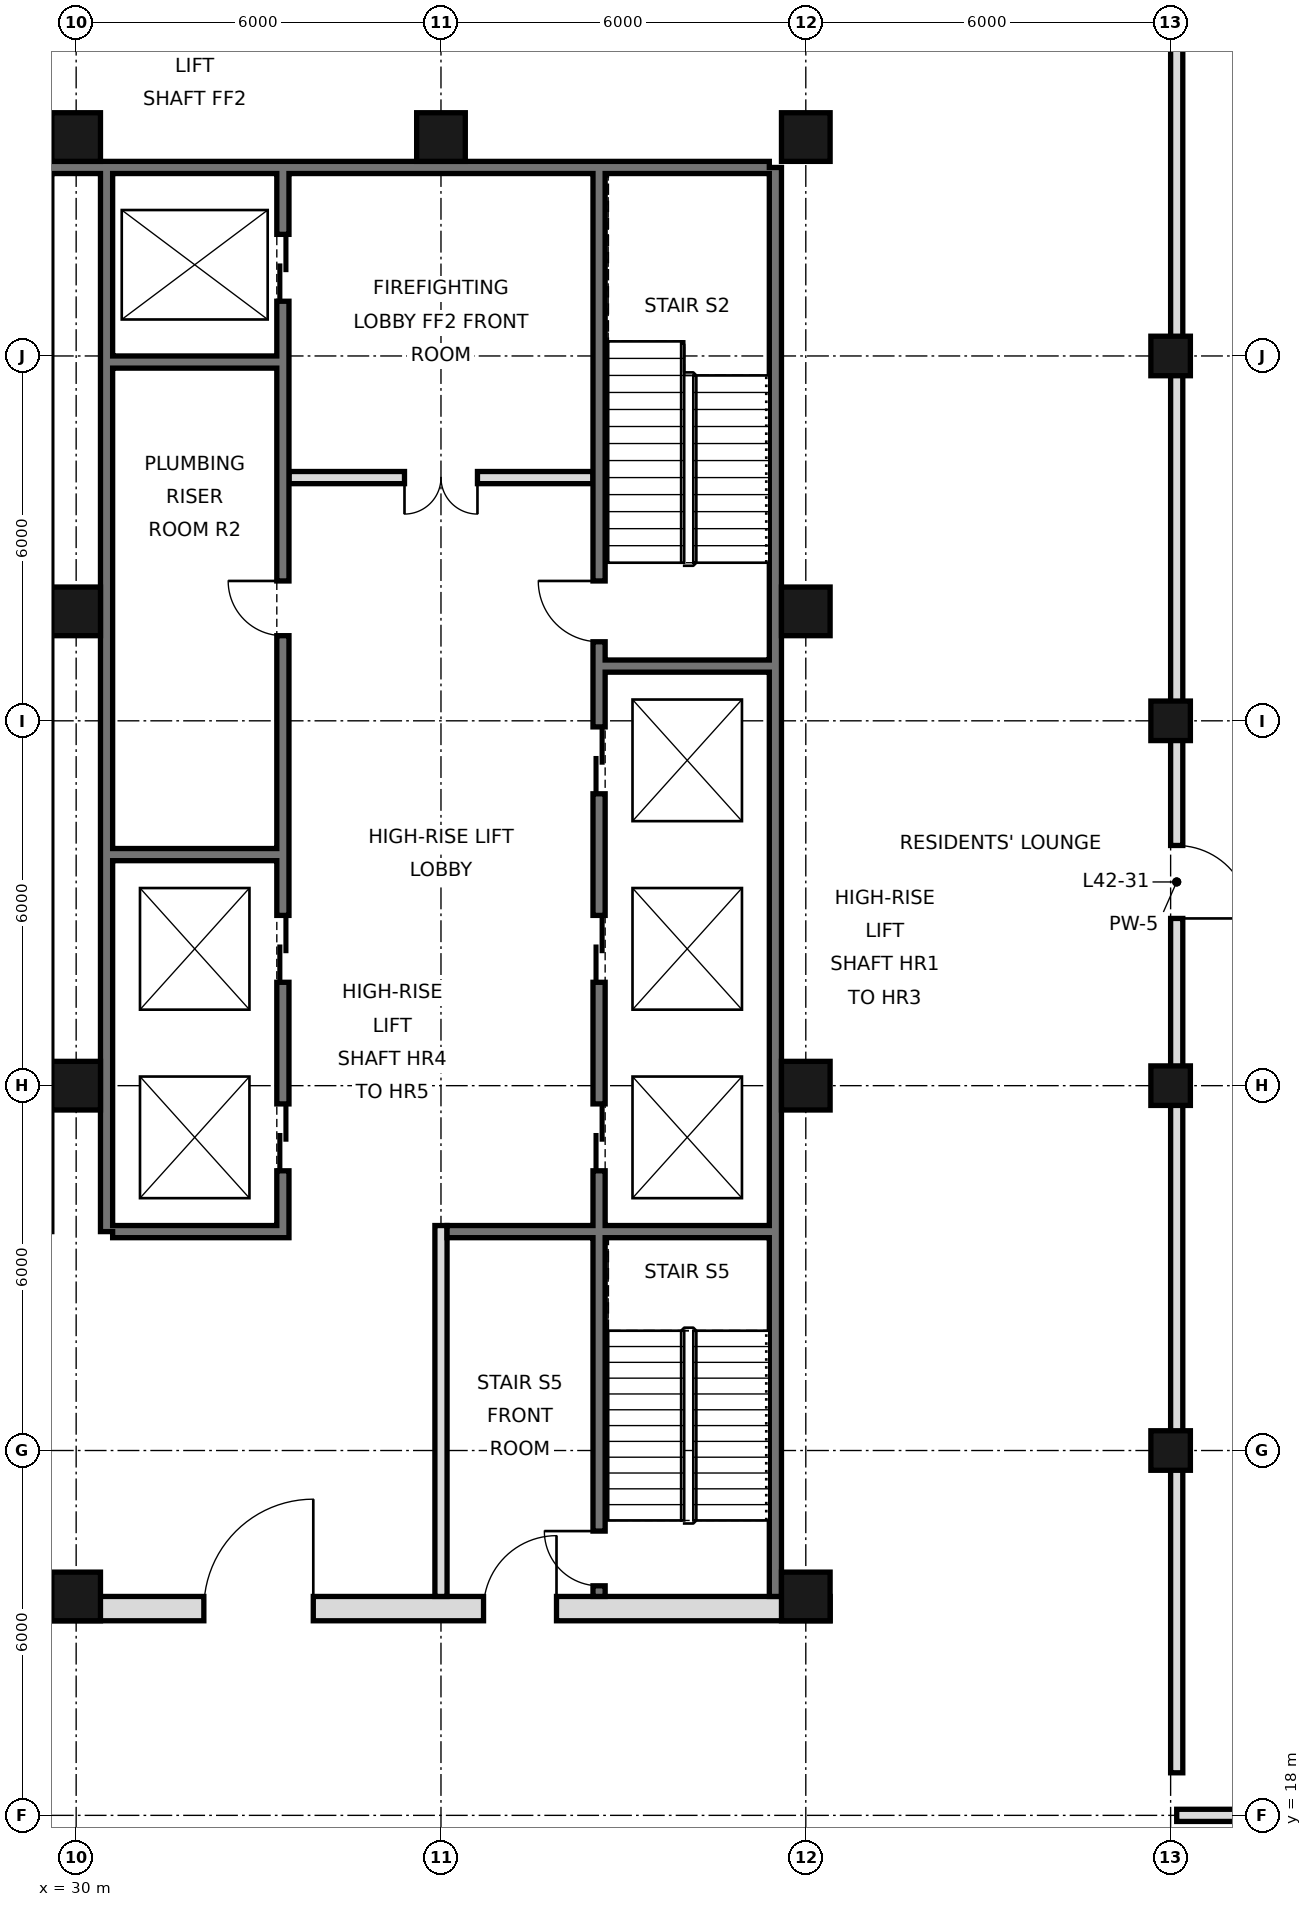
"""IFC4 building model, lengths in metres.
Left out: names, types, materials, properties, quantities, classifications, styles, units other than length and angle.
Written with IfcOpenShell. Run it as: python <this file> out.ifc"""

import sys

from ifc_helpers import new_model, si_unit, direction, frame, frame_2d, origin, origin_2d, place, context, subcontext, project, spatial, rectangle, hollow_rectangle, extrude, element, fill, save


model = new_model("IFC4")
c1 = context("Model", 3, precision=1e-05, world=origin(), true_north=direction((0.0, 1.0)))
c2 = subcontext(c1, "Body", "Model", "MODEL_VIEW")
j1 = project(units=[si_unit("LENGTHUNIT", "METRE"), si_unit("PLANEANGLEUNIT", "RADIAN")], contexts=[c1])
p1 = place(None, origin())
s1 = spatial("IfcSite", under=j1, at=p1, CompositionType="ELEMENT")
p2 = place(p1, origin())
s2 = spatial("IfcBuilding", under=s1, at=p2, CompositionType="ELEMENT")
p3 = place(p2, frame((0.0, 0.0, 181.6)))
s3 = spatial("IfcBuildingStorey", under=s2, at=p3, CompositionType="ELEMENT", Elevation=181.6)
for number, where, z_axis, x_axis in (
    (1, (30.0, 21.6, 0.0), (0.0, 0.0, 1.0), (1.0, 0.0, 0.0)),
    (2, (30.0, 30.0, 0.0), (0.0, 0.0, 1.0), (1.0, 0.0, 0.0)),
    (3, (30.0, 37.8, 0.0), (0.0, 0.0, 1.0), (1.0, 0.0, 0.0)),
    (4, (30.0, 45.6, 0.0), (0.0, 0.0, 1.0), (1.0, 0.0, 0.0)),
    (5, (36.0, 45.6, 0.0), (0.0, 0.0, 1.0), (1.0, 0.0, 0.0)),
    (6, (42.0, 21.6, 0.0), (0.0, 0.0, 1.0), (1.0, 0.0, 0.0)),
    (7, (42.0, 30.0, 0.0), (0.0, 0.0, 1.0), (1.0, 0.0, 0.0)),
    (8, (42.0, 37.8, 0.0), (0.0, 0.0, 1.0), (1.0, 0.0, 0.0)),
    (9, (42.0, 45.6, 0.0), (0.0, 0.0, 1.0), (1.0, 0.0, 0.0)),
):
    element("IfcColumn", number, at=place(p3, frame(where, z_axis=z_axis, x_axis=x_axis)), inside=s3, PredefinedType="COLUMN", context=c2, shape_type="SweptSolid", body=[
        extrude(hollow_rectangle(XDim=0.8, YDim=0.8, WallThickness=0.045, at=origin_2d()), origin(), (0.0, 0.0, 1.0), 4.4),
    ])
for number, where, z_axis, x_axis in (
    (10, (48.0, 24.0, 0.0), (0.0, 0.0, 1.0), (1.0, 0.0, 0.0)),
    (11, (48.0, 30.0, 0.0), (0.0, 0.0, 1.0), (1.0, 0.0, 0.0)),
    (12, (48.0, 36.0, 0.0), (0.0, 0.0, 1.0), (1.0, 0.0, 0.0)),
    (13, (48.0, 42.0, 0.0), (0.0, 0.0, 1.0), (1.0, 0.0, 0.0)),
):
    element("IfcColumn", number, at=place(p3, frame(where, z_axis=z_axis, x_axis=x_axis)), inside=s3, PredefinedType="COLUMN", context=c2, shape_type="SweptSolid", body=[
        extrude(hollow_rectangle(XDim=0.65, YDim=0.65, WallThickness=0.032, at=origin_2d()), origin(), (0.0, 0.0, 1.0), 4.4),
    ])
p4 = place(p3, frame((48.1, 18.7, 0.0), z_axis=(0.0, 0.0, 1.0), x_axis=(0.0, 1.0, 0.0)))
e14 = element("IfcWall", 14, at=p4, inside=s3, PredefinedType="SOLIDWALL", context=c2, shape_type="SweptSolid", body=[
    extrude(rectangle(XDim=29.3, YDim=0.2, at=frame_2d((14.65, 0.0))), origin(), (0.0, 0.0, 1.0), 3.4),
])
p5 = place(p4, frame((14.05, 0.0, 0.0)))
e15 = element("IfcOpeningElement", 15, at=p5, cuts=e14, PredefinedType="OPENING", context=c2, shape_type="SweptSolid", body=[
    extrude(rectangle(XDim=1.2, YDim=2.4, at=frame_2d((0.6, 1.2))), frame((0.0, 0.11, 0.0), z_axis=(0.0, -1.0, 0.0), x_axis=(1.0, 0.0, 0.0)), (0.0, 0.0, 1.0), 0.22),
])
p6 = place(p3, frame((48.1, 18.0, 0.0), z_axis=(0.0, 0.0, 1.0), x_axis=(1.0, 0.0, 0.0)))
e16 = element("IfcWall", 16, at=p6, inside=s3, PredefinedType="SOLIDWALL", context=c2, shape_type="SweptSolid", body=[
    extrude(rectangle(XDim=5.9, YDim=0.2, at=frame_2d((2.95, 0.0))), origin(), (0.0, 0.0, 1.0), 3.4),
])
p7 = place(p3, frame((41.5, 21.6, 0.0), z_axis=(0.0, 0.0, 1.0), x_axis=(0.0, 1.0, 0.0)))
e17 = element("IfcWall", 17, at=p7, inside=s3, PredefinedType="SOLIDWALL", context=c2, shape_type="SweptSolid", body=[
    extrude(rectangle(XDim=23.5, YDim=0.2, at=frame_2d((11.75, 0.0))), origin(), (0.0, 0.0, 1.0), 4.1),
])
p8 = place(p3, frame((6.6, 45.1, 0.0), z_axis=(0.0, 0.0, 1.0), x_axis=(1.0, 0.0, 0.0)))
e18 = element("IfcWall", 18, at=p8, inside=s3, PredefinedType="SOLIDWALL", context=c2, shape_type="SweptSolid", body=[
    extrude(rectangle(XDim=34.8, YDim=0.2, at=frame_2d((17.4, 0.0))), origin(), (0.0, 0.0, 1.0), 4.1),
])
p9 = place(p3, frame((30.5, 27.6, 0.0), z_axis=(0.0, 0.0, 1.0), x_axis=(0.0, 1.0, 0.0)))
e19 = element("IfcWall", 19, at=p9, inside=s3, PredefinedType="SOLIDWALL", context=c2, shape_type="SweptSolid", body=[
    extrude(rectangle(XDim=17.5, YDim=0.2, at=frame_2d((8.75, 0.0))), origin(), (0.0, 0.0, 1.0), 4.1),
])
p10 = place(p3, frame((5.6, 21.4, 0.0), z_axis=(0.0, 0.0, 1.0), x_axis=(1.0, 0.0, 0.0)))
e20 = element("IfcWall", 20, at=p10, inside=s3, PredefinedType="SOLIDWALL", context=c2, shape_type="SweptSolid", body=[
    extrude(rectangle(XDim=36.8, YDim=0.4, at=frame_2d((18.4, 0.0))), origin(), (0.0, 0.0, 1.0), 4.1),
])
p11 = place(p10, frame((8.5, 0.0, 0.0)))
e21 = element("IfcOpeningElement", 21, at=p11, cuts=e20, PredefinedType="OPENING", context=c2, shape_type="SweptSolid", body=[
    extrude(rectangle(XDim=1.8, YDim=2.1, at=frame_2d((0.9, 1.05))), frame((0.0, 0.21, 0.0), z_axis=(0.0, -1.0, 0.0), x_axis=(1.0, 0.0, 0.0)), (0.0, 0.0, 1.0), 0.42),
])
p12 = place(p10, frame((17.5, 0.0, 0.0)))
e22 = element("IfcOpeningElement", 22, at=p12, cuts=e20, PredefinedType="OPENING", context=c2, shape_type="SweptSolid", body=[
    extrude(rectangle(XDim=1.8, YDim=2.1, at=frame_2d((0.9, 1.05))), frame((0.0, 0.21, 0.0), z_axis=(0.0, -1.0, 0.0), x_axis=(1.0, 0.0, 0.0)), (0.0, 0.0, 1.0), 0.42),
])
p13 = place(p10, frame((26.5, 0.0, 0.0)))
e23 = element("IfcOpeningElement", 23, at=p13, cuts=e20, PredefinedType="OPENING", context=c2, shape_type="SweptSolid", body=[
    extrude(rectangle(XDim=1.8, YDim=2.1, at=frame_2d((0.9, 1.05))), frame((0.0, 0.21, 0.0), z_axis=(0.0, -1.0, 0.0), x_axis=(1.0, 0.0, 0.0)), (0.0, 0.0, 1.0), 0.42),
])
p14 = place(p10, frame((4.5, 0.0, 0.0)))
e24 = element("IfcOpeningElement", 24, at=p14, cuts=e20, PredefinedType="OPENING", context=c2, shape_type="SweptSolid", body=[
    extrude(rectangle(XDim=1.2, YDim=2.1, at=frame_2d((0.6, 1.05))), frame((0.0, 0.21, 0.0), z_axis=(0.0, -1.0, 0.0), x_axis=(1.0, 0.0, 0.0)), (0.0, 0.0, 1.0), 0.42),
])
p15 = place(p10, frame((31.1, 0.0, 0.0)))
e25 = element("IfcOpeningElement", 25, at=p15, cuts=e20, PredefinedType="OPENING", context=c2, shape_type="SweptSolid", body=[
    extrude(rectangle(XDim=1.2, YDim=2.1, at=frame_2d((0.6, 1.05))), frame((0.0, 0.21, 0.0), z_axis=(0.0, -1.0, 0.0), x_axis=(1.0, 0.0, 0.0)), (0.0, 0.0, 1.0), 0.42),
])
p16 = place(p3, frame((33.4, 27.5, 0.0), z_axis=(0.0, 0.0, 1.0), x_axis=(0.0, 1.0, 0.0)))
e26 = element("IfcWall", 26, at=p16, inside=s3, PredefinedType="SOLIDWALL", context=c2, shape_type="SweptSolid", body=[
    extrude(rectangle(XDim=17.5, YDim=0.2, at=frame_2d((8.75, 0.0))), origin(), (0.0, 0.0, 1.0), 4.1),
])
p17 = place(p16, frame((1.1, 0.0, 0.0)))
e27 = element("IfcOpeningElement", 27, at=p17, cuts=e26, PredefinedType="OPENING", context=c2, shape_type="SweptSolid", body=[
    extrude(rectangle(XDim=1.1, YDim=2.1, at=frame_2d((0.55, 1.05))), frame((0.0, 0.11, 0.0), z_axis=(0.0, -1.0, 0.0), x_axis=(1.0, 0.0, 0.0)), (0.0, 0.0, 1.0), 0.22),
])
p18 = place(p16, frame((4.2, 0.0, 0.0)))
e28 = element("IfcOpeningElement", 28, at=p18, cuts=e26, PredefinedType="OPENING", context=c2, shape_type="SweptSolid", body=[
    extrude(rectangle(XDim=1.1, YDim=2.1, at=frame_2d((0.55, 1.05))), frame((0.0, 0.11, 0.0), z_axis=(0.0, -1.0, 0.0), x_axis=(1.0, 0.0, 0.0)), (0.0, 0.0, 1.0), 0.22),
])
p19 = place(p16, frame((15.4, 0.0, 0.0)))
e29 = element("IfcOpeningElement", 29, at=p19, cuts=e26, PredefinedType="OPENING", context=c2, shape_type="SweptSolid", body=[
    extrude(rectangle(XDim=1.1, YDim=2.1, at=frame_2d((0.55, 1.05))), frame((0.0, 0.11, 0.0), z_axis=(0.0, -1.0, 0.0), x_axis=(1.0, 0.0, 0.0)), (0.0, 0.0, 1.0), 0.22),
])
p20 = place(p16, frame((9.9, 0.0, 0.0)))
e30 = element("IfcOpeningElement", 30, at=p20, cuts=e26, PredefinedType="OPENING", context=c2, shape_type="SweptSolid", body=[
    extrude(rectangle(XDim=0.9, YDim=2.1, at=frame_2d((0.45, 1.05))), frame((0.0, 0.11, 0.0), z_axis=(0.0, -1.0, 0.0), x_axis=(1.0, 0.0, 0.0)), (0.0, 0.0, 1.0), 0.22),
])
p21 = place(p3, frame((36.0, 21.6, 0.0), z_axis=(0.0, 0.0, 1.0), x_axis=(0.0, 1.0, 0.0)))
e31 = element("IfcWall", 31, at=p21, inside=s3, PredefinedType="PARTITIONING", context=c2, shape_type="SweptSolid", body=[
    extrude(rectangle(XDim=6.1, YDim=0.2, at=frame_2d((3.05, 0.0))), origin(), (0.0, 0.0, 1.0), 4.1),
])
p22 = place(p3, frame((38.6, 21.6, 0.0), z_axis=(0.0, 0.0, 1.0), x_axis=(0.0, 1.0, 0.0)))
e32 = element("IfcWall", 32, at=p22, inside=s3, PredefinedType="SOLIDWALL", context=c2, shape_type="SweptSolid", body=[
    extrude(rectangle(XDim=23.4, YDim=0.2, at=frame_2d((11.7, 0.0))), origin(), (0.0, 0.0, 1.0), 4.1),
])
p23 = place(p22, frame((7.0, 0.0, 0.0)))
e33 = element("IfcOpeningElement", 33, at=p23, cuts=e32, PredefinedType="OPENING", context=c2, shape_type="SweptSolid", body=[
    extrude(rectangle(XDim=1.1, YDim=2.1, at=frame_2d((0.55, 1.05))), frame((0.0, 0.11, 0.0), z_axis=(0.0, -1.0, 0.0), x_axis=(1.0, 0.0, 0.0)), (0.0, 0.0, 1.0), 0.22),
])
p24 = place(p22, frame((10.1, 0.0, 0.0)))
e34 = element("IfcOpeningElement", 34, at=p24, cuts=e32, PredefinedType="OPENING", context=c2, shape_type="SweptSolid", body=[
    extrude(rectangle(XDim=1.1, YDim=2.1, at=frame_2d((0.55, 1.05))), frame((0.0, 0.11, 0.0), z_axis=(0.0, -1.0, 0.0), x_axis=(1.0, 0.0, 0.0)), (0.0, 0.0, 1.0), 0.22),
])
p25 = place(p22, frame((13.2, 0.0, 0.0)))
e35 = element("IfcOpeningElement", 35, at=p25, cuts=e32, PredefinedType="OPENING", context=c2, shape_type="SweptSolid", body=[
    extrude(rectangle(XDim=1.1, YDim=2.1, at=frame_2d((0.55, 1.05))), frame((0.0, 0.11, 0.0), z_axis=(0.0, -1.0, 0.0), x_axis=(1.0, 0.0, 0.0)), (0.0, 0.0, 1.0), 0.22),
])
p26 = place(p22, frame((15.7, 0.0, 0.0)))
e36 = element("IfcOpeningElement", 36, at=p26, cuts=e32, PredefinedType="OPENING", context=c2, shape_type="SweptSolid", body=[
    extrude(rectangle(XDim=1.0, YDim=2.1, at=frame_2d((0.5, 1.05))), frame((0.0, 0.11, 0.0), z_axis=(0.0, -1.0, 0.0), x_axis=(1.0, 0.0, 0.0)), (0.0, 0.0, 1.0), 0.22),
])
p27 = place(p22, frame((0.175, 0.0, 0.0)))
e37 = element("IfcOpeningElement", 37, at=p27, cuts=e32, PredefinedType="OPENING", context=c2, shape_type="SweptSolid", body=[
    extrude(rectangle(XDim=0.9, YDim=2.1, at=frame_2d((0.45, 1.05))), frame((0.0, 0.11, 0.0), z_axis=(0.0, -1.0, 0.0), x_axis=(1.0, 0.0, 0.0)), (0.0, 0.0, 1.0), 0.22),
])
p28 = place(p3, frame((30.6, 27.6, 0.0), z_axis=(0.0, 0.0, 1.0), x_axis=(1.0, 0.0, 0.0)))
e38 = element("IfcWall", 38, at=p28, inside=s3, PredefinedType="SOLIDWALL", context=c2, shape_type="SweptSolid", body=[
    extrude(rectangle(XDim=2.7, YDim=0.2, at=frame_2d((1.35, 0.0))), origin(), (0.0, 0.0, 1.0), 4.1),
])
p29 = place(p3, frame((36.1, 27.6, 0.0), z_axis=(0.0, 0.0, 1.0), x_axis=(1.0, 0.0, 0.0)))
e39 = element("IfcWall", 39, at=p29, inside=s3, PredefinedType="SOLIDWALL", context=c2, shape_type="SweptSolid", body=[
    extrude(rectangle(XDim=5.3, YDim=0.2, at=frame_2d((2.65, 0.0))), origin(), (0.0, 0.0, 1.0), 4.1),
])
for number, where, z_axis, x_axis in (
    (40, (30.6, 33.8, 0.0), (0.0, 0.0, 1.0), (1.0, 0.0, 0.0)),
    (41, (38.7, 36.9, 0.0), (0.0, 0.0, 1.0), (1.0, 0.0, 0.0)),
):
    element("IfcWall", number, at=place(p3, frame(where, z_axis=z_axis, x_axis=x_axis)), inside=s3, PredefinedType="SOLIDWALL", context=c2, shape_type="SweptSolid", body=[
        extrude(rectangle(XDim=2.7, YDim=0.2, at=frame_2d((1.35, 0.0))), origin(), (0.0, 0.0, 1.0), 4.1),
    ])
p30 = place(p3, frame((33.5, 40.0, 0.0), z_axis=(0.0, 0.0, 1.0), x_axis=(1.0, 0.0, 0.0)))
e42 = element("IfcWall", 42, at=p30, inside=s3, PredefinedType="PARTITIONING", context=c2, shape_type="SweptSolid", body=[
    extrude(rectangle(XDim=5.0, YDim=0.2, at=frame_2d((2.5, 0.0))), origin(), (0.0, 0.0, 1.0), 4.1),
])
p31 = place(p30, frame((1.9, 0.0, 0.0)))
e43 = element("IfcOpeningElement", 43, at=p31, cuts=e42, PredefinedType="OPENING", context=c2, shape_type="SweptSolid", body=[
    extrude(rectangle(XDim=1.2, YDim=2.1, at=frame_2d((0.6, 1.05))), frame((0.0, 0.11, 0.0), z_axis=(0.0, -1.0, 0.0), x_axis=(1.0, 0.0, 0.0)), (0.0, 0.0, 1.0), 0.22),
])
p32 = place(p3, frame((30.6, 41.9, 0.0), z_axis=(0.0, 0.0, 1.0), x_axis=(1.0, 0.0, 0.0)))
e44 = element("IfcWall", 44, at=p32, inside=s3, PredefinedType="SOLIDWALL", context=c2, shape_type="SweptSolid", body=[
    extrude(rectangle(XDim=2.7, YDim=0.2, at=frame_2d((1.35, 0.0))), origin(), (0.0, 0.0, 1.0), 4.1),
])
p33 = place(p5, frame((1.2, 0.0, 0.0), z_axis=(0.0, 0.0, 1.0), x_axis=(-1.0, 0.0, 0.0)))
e45 = element("IfcDoor", 45, at=p33, inside=s3, OperationType="SINGLE_SWING_RIGHT", PredefinedType="DOOR", context=c2, shape_type="SweptSolid", body=[
    extrude(rectangle(XDim=1.2, YDim=2.4, at=frame_2d((0.6, 1.2))), frame((0.0, 0.025, 0.0), z_axis=(0.0, -1.0, 0.0), x_axis=(1.0, 0.0, 0.0)), (0.0, 0.0, 1.0), 0.05),
])
fill(e15, e45)
p34 = place(p13, frame((1.8, 0.0, 0.0), z_axis=(0.0, 0.0, 1.0), x_axis=(-1.0, 0.0, 0.0)))
e46 = element("IfcDoor", 46, at=p34, inside=s3, OperationType="SINGLE_SWING_LEFT", PredefinedType="DOOR", context=c2, shape_type="SweptSolid", body=[
    extrude(rectangle(XDim=1.8, YDim=2.1, at=frame_2d((0.9, 1.05))), frame((0.0, 0.025, 0.0), z_axis=(0.0, -1.0, 0.0), x_axis=(1.0, 0.0, 0.0)), (0.0, 0.0, 1.0), 0.05),
])
fill(e23, e46)
p35 = place(p15, frame((1.2, 0.0, 0.0), z_axis=(0.0, 0.0, 1.0), x_axis=(-1.0, 0.0, 0.0)))
e47 = element("IfcDoor", 47, at=p35, inside=s3, OperationType="SINGLE_SWING_LEFT", PredefinedType="DOOR", context=c2, shape_type="SweptSolid", body=[
    extrude(rectangle(XDim=1.2, YDim=2.1, at=frame_2d((0.6, 1.05))), frame((0.0, 0.025, 0.0), z_axis=(0.0, -1.0, 0.0), x_axis=(1.0, 0.0, 0.0)), (0.0, 0.0, 1.0), 0.05),
])
fill(e25, e47)
p36 = place(p31, frame((1.2, 0.0, 0.0), z_axis=(0.0, 0.0, 1.0), x_axis=(-1.0, 0.0, 0.0)))
e48 = element("IfcDoor", 48, at=p36, inside=s3, OperationType="DOUBLE_DOOR_SINGLE_SWING", PredefinedType="DOOR", context=c2, shape_type="SweptSolid", body=[
    extrude(rectangle(XDim=1.2, YDim=2.1, at=frame_2d((0.6, 1.05))), frame((0.0, 0.025, 0.0), z_axis=(0.0, -1.0, 0.0), x_axis=(1.0, 0.0, 0.0)), (0.0, 0.0, 1.0), 0.05),
])
fill(e43, e48)
p37 = place(p23, origin())
e49 = element("IfcDoor", 49, at=p37, inside=s3, OperationType="DOUBLE_DOOR_SLIDING", PredefinedType="DOOR", context=c2, shape_type="SweptSolid", body=[
    extrude(rectangle(XDim=1.1, YDim=2.1, at=frame_2d((0.55, 1.05))), frame((0.0, 0.025, 0.0), z_axis=(0.0, -1.0, 0.0), x_axis=(1.0, 0.0, 0.0)), (0.0, 0.0, 1.0), 0.05),
])
fill(e33, e49)
p38 = place(p24, origin())
e50 = element("IfcDoor", 50, at=p38, inside=s3, OperationType="DOUBLE_DOOR_SLIDING", PredefinedType="DOOR", context=c2, shape_type="SweptSolid", body=[
    extrude(rectangle(XDim=1.1, YDim=2.1, at=frame_2d((0.55, 1.05))), frame((0.0, 0.025, 0.0), z_axis=(0.0, -1.0, 0.0), x_axis=(1.0, 0.0, 0.0)), (0.0, 0.0, 1.0), 0.05),
])
fill(e34, e50)
p39 = place(p25, origin())
e51 = element("IfcDoor", 51, at=p39, inside=s3, OperationType="DOUBLE_DOOR_SLIDING", PredefinedType="DOOR", context=c2, shape_type="SweptSolid", body=[
    extrude(rectangle(XDim=1.1, YDim=2.1, at=frame_2d((0.55, 1.05))), frame((0.0, 0.025, 0.0), z_axis=(0.0, -1.0, 0.0), x_axis=(1.0, 0.0, 0.0)), (0.0, 0.0, 1.0), 0.05),
])
fill(e35, e51)
p40 = place(p17, origin())
e52 = element("IfcDoor", 52, at=p40, inside=s3, OperationType="DOUBLE_DOOR_SLIDING", PredefinedType="DOOR", context=c2, shape_type="SweptSolid", body=[
    extrude(rectangle(XDim=1.1, YDim=2.1, at=frame_2d((0.55, 1.05))), frame((0.0, 0.025, 0.0), z_axis=(0.0, -1.0, 0.0), x_axis=(1.0, 0.0, 0.0)), (0.0, 0.0, 1.0), 0.05),
])
fill(e27, e52)
p41 = place(p18, origin())
e53 = element("IfcDoor", 53, at=p41, inside=s3, OperationType="DOUBLE_DOOR_SLIDING", PredefinedType="DOOR", context=c2, shape_type="SweptSolid", body=[
    extrude(rectangle(XDim=1.1, YDim=2.1, at=frame_2d((0.55, 1.05))), frame((0.0, 0.025, 0.0), z_axis=(0.0, -1.0, 0.0), x_axis=(1.0, 0.0, 0.0)), (0.0, 0.0, 1.0), 0.05),
])
fill(e28, e53)
p42 = place(p19, origin())
e54 = element("IfcDoor", 54, at=p42, inside=s3, OperationType="DOUBLE_DOOR_SLIDING", PredefinedType="DOOR", context=c2, shape_type="SweptSolid", body=[
    extrude(rectangle(XDim=1.1, YDim=2.1, at=frame_2d((0.55, 1.05))), frame((0.0, 0.025, 0.0), z_axis=(0.0, -1.0, 0.0), x_axis=(1.0, 0.0, 0.0)), (0.0, 0.0, 1.0), 0.05),
])
fill(e29, e54)
p43 = place(p26, frame((1.0, 0.0, 0.0), z_axis=(0.0, 0.0, 1.0), x_axis=(-1.0, 0.0, 0.0)))
e55 = element("IfcDoor", 55, at=p43, inside=s3, OperationType="SINGLE_SWING_LEFT", PredefinedType="DOOR", context=c2, shape_type="SweptSolid", body=[
    extrude(rectangle(XDim=1.0, YDim=2.1, at=frame_2d((0.5, 1.05))), frame((0.0, 0.025, 0.0), z_axis=(0.0, -1.0, 0.0), x_axis=(1.0, 0.0, 0.0)), (0.0, 0.0, 1.0), 0.05),
])
fill(e36, e55)
p44 = place(p27, frame((0.9, 0.0, 0.0), z_axis=(0.0, 0.0, 1.0), x_axis=(-1.0, 0.0, 0.0)))
e56 = element("IfcDoor", 56, at=p44, inside=s3, OperationType="SINGLE_SWING_LEFT", PredefinedType="DOOR", context=c2, shape_type="SweptSolid", body=[
    extrude(rectangle(XDim=0.9, YDim=2.1, at=frame_2d((0.45, 1.05))), frame((0.0, 0.025, 0.0), z_axis=(0.0, -1.0, 0.0), x_axis=(1.0, 0.0, 0.0)), (0.0, 0.0, 1.0), 0.05),
])
fill(e37, e56)
p45 = place(p20, frame((0.9, 0.0, 0.0), z_axis=(0.0, 0.0, 1.0), x_axis=(-1.0, 0.0, 0.0)))
e57 = element("IfcDoor", 57, at=p45, inside=s3, OperationType="SINGLE_SWING_LEFT", PredefinedType="DOOR", context=c2, shape_type="SweptSolid", body=[
    extrude(rectangle(XDim=0.9, YDim=2.1, at=frame_2d((0.45, 1.05))), frame((0.0, 0.025, 0.0), z_axis=(0.0, -1.0, 0.0), x_axis=(1.0, 0.0, 0.0)), (0.0, 0.0, 1.0), 0.05),
])
fill(e30, e57)
save(model, sys.argv[1])
